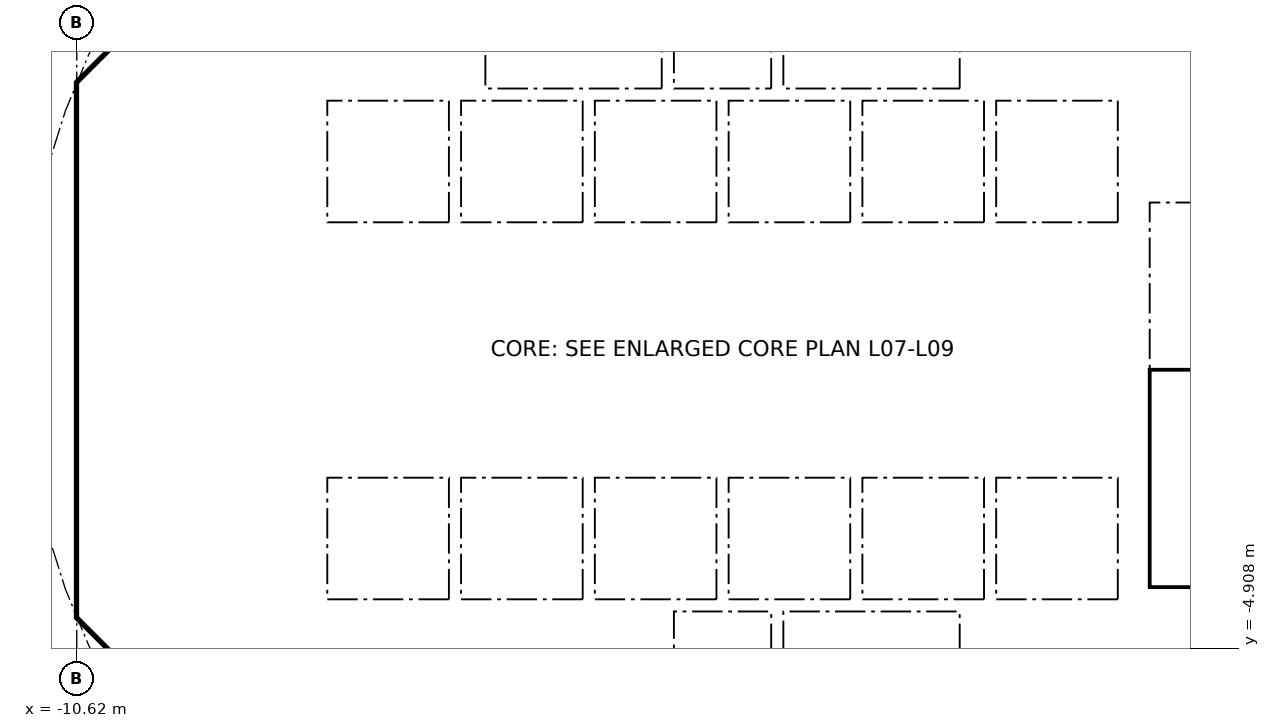
"""IFC4 building model, lengths in metres.
Left out: names, types, materials, properties, quantities, classifications, styles, units other than length and angle.
Written with IfcOpenShell. Run it as: python <this file> out.ifc"""

import sys

from ifc_helpers import new_model, si_unit, direction, frame, frame_2d, origin, place, context, subcontext, project, spatial, polyline, rectangle, outline, extrude, element, fill, save


model = new_model("IFC4")
c1 = context("Model", 3, precision=1e-05, world=origin(), true_north=direction((0.0, 1.0)))
c2 = subcontext(c1, "Body", "Model", "MODEL_VIEW")
j1 = project(units=[si_unit("LENGTHUNIT", "METRE"), si_unit("PLANEANGLEUNIT", "RADIAN")], contexts=[c1])
p1 = place(None, origin())
s1 = spatial("IfcSite", under=j1, at=p1, CompositionType="ELEMENT")
p2 = place(p1, origin())
s2 = spatial("IfcBuilding", under=s1, at=p2, CompositionType="ELEMENT")
p3 = place(p2, frame((0.0, 0.0, 38.1)))
s3 = spatial("IfcBuildingStorey", under=s2, at=p3, CompositionType="ELEMENT", Elevation=38.1)
p4 = place(p3, frame((9.988, 4.613, 0.0), z_axis=(0.0, 0.0, 1.0), x_axis=(-0.707106781187, 0.707106781187, 0.0)))
e1 = element("IfcWall", 1, at=p4, inside=s3, PredefinedType="SHEAR", context=c2, shape_type="SweptSolid", body=[
    extrude(rectangle(XDim=7.602, YDim=0.6, at=frame_2d((3.801, 0.0))), origin(), (0.0, 0.0, 1.0), 3.44),
])
p5 = place(p4, frame((3.201, 0.0, 0.0)))
e2 = element("IfcOpeningElement", 2, at=p5, cuts=e1, PredefinedType="OPENING", context=c2, shape_type="SweptSolid", body=[
    extrude(rectangle(XDim=1.2, YDim=2.1, at=frame_2d((0.6, 1.05))), frame((0.0, 0.31, 0.0), z_axis=(0.0, -1.0, 0.0), x_axis=(1.0, 0.0, 0.0)), (0.0, 0.0, 1.0), 0.62),
])
p6 = place(p3, frame((-4.613, 9.988, 0.0), z_axis=(0.0, 0.0, 1.0), x_axis=(-0.707106781187, -0.707106781187, 0.0)))
e3 = element("IfcWall", 3, at=p6, inside=s3, PredefinedType="SHEAR", context=c2, shape_type="SweptSolid", body=[
    extrude(rectangle(XDim=7.602, YDim=0.6, at=frame_2d((3.801, 0.0))), origin(), (0.0, 0.0, 1.0), 3.44),
])
p7 = place(p6, frame((0.351, 0.0, 0.0)))
e4 = element("IfcOpeningElement", 4, at=p7, cuts=e3, PredefinedType="OPENING", context=c2, shape_type="SweptSolid", body=[
    extrude(rectangle(XDim=1.1, YDim=2.1, at=frame_2d((0.55, 1.05))), frame((0.0, 0.31, 0.0), z_axis=(0.0, -1.0, 0.0), x_axis=(1.0, 0.0, 0.0)), (0.0, 0.0, 1.0), 0.62),
])
p8 = place(p3, frame((-10.325, 3.801, 0.0), z_axis=(0.0, 0.0, 1.0), x_axis=(0.0, -1.0, 0.0)))
e5 = element("IfcWall", 5, at=p8, inside=s3, PredefinedType="SHEAR", context=c2, shape_type="SweptSolid", body=[
    extrude(rectangle(XDim=7.602, YDim=0.6, at=frame_2d((3.801, 0.0))), origin(), (0.0, 0.0, 1.0), 3.44),
])
p9 = place(p8, frame((0.651, 0.0, 0.0)))
e6 = element("IfcOpeningElement", 6, at=p9, cuts=e5, PredefinedType="OPENING", context=c2, shape_type="SweptSolid", body=[
    extrude(rectangle(XDim=1.5, YDim=2.1, at=frame_2d((0.75, 1.05))), frame((0.0, 0.31, 0.0), z_axis=(0.0, -1.0, 0.0), x_axis=(1.0, 0.0, 0.0)), (0.0, 0.0, 1.0), 0.62),
])
p10 = place(p8, frame((5.451, 0.0, 0.0)))
e7 = element("IfcOpeningElement", 7, at=p10, cuts=e5, PredefinedType="OPENING", context=c2, shape_type="SweptSolid", body=[
    extrude(rectangle(XDim=1.5, YDim=2.1, at=frame_2d((0.75, 1.05))), frame((0.0, 0.31, 0.0), z_axis=(0.0, -1.0, 0.0), x_axis=(1.0, 0.0, 0.0)), (0.0, 0.0, 1.0), 0.62),
])
p11 = place(p3, frame((-9.988, -4.613, 0.0), z_axis=(0.0, 0.0, 1.0), x_axis=(0.707106781187, -0.707106781187, 0.0)))
e8 = element("IfcWall", 8, at=p11, inside=s3, PredefinedType="SHEAR", context=c2, shape_type="SweptSolid", body=[
    extrude(rectangle(XDim=7.602, YDim=0.6, at=frame_2d((3.801, 0.0))), origin(), (0.0, 0.0, 1.0), 3.44),
])
p12 = place(p11, frame((6.151, 0.0, 0.0)))
e9 = element("IfcOpeningElement", 9, at=p12, cuts=e8, PredefinedType="OPENING", context=c2, shape_type="SweptSolid", body=[
    extrude(rectangle(XDim=1.1, YDim=2.1, at=frame_2d((0.55, 1.05))), frame((0.0, 0.31, 0.0), z_axis=(0.0, -1.0, 0.0), x_axis=(1.0, 0.0, 0.0)), (0.0, 0.0, 1.0), 0.62),
])
p13 = place(p3, frame((4.613, -9.988, 0.0), z_axis=(0.0, 0.0, 1.0), x_axis=(0.707106781187, 0.707106781187, 0.0)))
e10 = element("IfcWall", 10, at=p13, inside=s3, PredefinedType="SHEAR", context=c2, shape_type="SweptSolid", body=[
    extrude(rectangle(XDim=7.602, YDim=0.6, at=frame_2d((3.801, 0.0))), origin(), (0.0, 0.0, 1.0), 3.44),
])
p14 = place(p13, frame((3.201, 0.0, 0.0)))
e11 = element("IfcOpeningElement", 11, at=p14, cuts=e10, PredefinedType="OPENING", context=c2, shape_type="SweptSolid", body=[
    extrude(rectangle(XDim=1.2, YDim=2.1, at=frame_2d((0.6, 1.05))), frame((0.0, 0.31, 0.0), z_axis=(0.0, -1.0, 0.0), x_axis=(1.0, 0.0, 0.0)), (0.0, 0.0, 1.0), 0.62),
])
p15 = place(p3, frame((-6.2, 4.3, 0.0), z_axis=(0.0, 0.0, 1.0), x_axis=(0.0, 1.0, 0.0)))
e12 = element("IfcWall", 12, at=p15, inside=s3, PredefinedType="PARTITIONING", context=c2, shape_type="SweptSolid", body=[
    extrude(rectangle(XDim=3.527, YDim=0.15, at=frame_2d((1.763, 0.0))), origin(), (0.0, 0.0, 1.0), 3.44),
])
p16 = place(p15, frame((0.262, 0.0, 0.0)))
e13 = element("IfcOpeningElement", 13, at=p16, cuts=e12, PredefinedType="OPENING", context=c2, shape_type="SweptSolid", body=[
    extrude(rectangle(XDim=0.9, YDim=2.1, at=frame_2d((0.45, 1.05))), frame((0.0, 0.085, 0.0), z_axis=(0.0, -1.0, 0.0), x_axis=(1.0, 0.0, 0.0)), (0.0, 0.0, 1.0), 0.17),
])
p17 = place(p15, frame((2.138, 0.0, 0.0)))
e14 = element("IfcOpeningElement", 14, at=p17, cuts=e12, PredefinedType="OPENING", context=c2, shape_type="SweptSolid", body=[
    extrude(rectangle(XDim=0.9, YDim=2.1, at=frame_2d((0.45, 1.05))), frame((0.0, 0.085, 0.0), z_axis=(0.0, -1.0, 0.0), x_axis=(1.0, 0.0, 0.0)), (0.0, 0.0, 1.0), 0.17),
])
p18 = place(p3, frame((4.0, 4.3, 0.0), z_axis=(0.0, 0.0, 1.0), x_axis=(0.0, 1.0, 0.0)))
e15 = element("IfcWall", 15, at=p18, inside=s3, PredefinedType="SOLIDWALL", context=c2, shape_type="SweptSolid", body=[
    extrude(rectangle(XDim=2.2, YDim=0.2, at=frame_2d((1.1, 0.0))), origin(), (0.0, 0.0, 1.0), 3.44),
])
p19 = place(p18, frame((0.55, 0.0, 0.0)))
e16 = element("IfcOpeningElement", 16, at=p19, cuts=e15, PredefinedType="OPENING", context=c2, shape_type="SweptSolid", body=[
    extrude(rectangle(XDim=1.1, YDim=2.1, at=frame_2d((0.55, 1.05))), frame((0.0, 0.11, 0.0), z_axis=(0.0, -1.0, 0.0), x_axis=(1.0, 0.0, 0.0)), (0.0, 0.0, 1.0), 0.22),
])
p20 = place(p3, frame((-4.0, 4.3, 0.0), z_axis=(0.0, 0.0, 1.0), x_axis=(0.0, 1.0, 0.0)))
e17 = element("IfcWall", 17, at=p20, inside=s3, PredefinedType="SOLIDWALL", context=c2, shape_type="SweptSolid", body=[
    extrude(rectangle(XDim=2.2, YDim=0.2, at=frame_2d((1.1, 0.0))), origin(), (0.0, 0.0, 1.0), 3.44),
])
p21 = place(p20, frame((0.55, 0.0, 0.0)))
e18 = element("IfcOpeningElement", 18, at=p21, cuts=e17, PredefinedType="OPENING", context=c2, shape_type="SweptSolid", body=[
    extrude(rectangle(XDim=1.1, YDim=2.1, at=frame_2d((0.55, 1.05))), frame((0.0, 0.11, 0.0), z_axis=(0.0, -1.0, 0.0), x_axis=(1.0, 0.0, 0.0)), (0.0, 0.0, 1.0), 0.22),
])
p22 = place(p3, frame((-6.7, 2.0, 0.0), z_axis=(0.0, 0.0, 1.0), x_axis=(1.0, 0.0, 0.0)))
e19 = element("IfcWall", 19, at=p22, inside=s3, PredefinedType="SOLIDWALL", context=c2, shape_type="SweptSolid", body=[
    extrude(rectangle(XDim=13.4, YDim=0.2, at=frame_2d((6.7, 0.0))), origin(), (0.0, 0.0, 1.0), 3.44),
])
p23 = place(p22, frame((0.65, 0.0, 0.0)))
e20 = element("IfcOpeningElement", 20, at=p23, cuts=e19, PredefinedType="OPENING", context=c2, shape_type="SweptSolid", body=[
    extrude(rectangle(XDim=1.1, YDim=2.1, at=frame_2d((0.55, 1.05))), frame((0.0, 0.11, 0.0), z_axis=(0.0, -1.0, 0.0), x_axis=(1.0, 0.0, 0.0)), (0.0, 0.0, 1.0), 0.22),
])
p24 = place(p22, frame((2.85, 0.0, 0.0)))
e21 = element("IfcOpeningElement", 21, at=p24, cuts=e19, PredefinedType="OPENING", context=c2, shape_type="SweptSolid", body=[
    extrude(rectangle(XDim=1.1, YDim=2.1, at=frame_2d((0.55, 1.05))), frame((0.0, 0.11, 0.0), z_axis=(0.0, -1.0, 0.0), x_axis=(1.0, 0.0, 0.0)), (0.0, 0.0, 1.0), 0.22),
])
p25 = place(p22, frame((5.05, 0.0, 0.0)))
e22 = element("IfcOpeningElement", 22, at=p25, cuts=e19, PredefinedType="OPENING", context=c2, shape_type="SweptSolid", body=[
    extrude(rectangle(XDim=1.1, YDim=2.1, at=frame_2d((0.55, 1.05))), frame((0.0, 0.11, 0.0), z_axis=(0.0, -1.0, 0.0), x_axis=(1.0, 0.0, 0.0)), (0.0, 0.0, 1.0), 0.22),
])
p26 = place(p3, frame((6.7, 4.0, 0.0), z_axis=(0.0, 0.0, 1.0), x_axis=(1.0, 0.0, 0.0)))
e23 = element("IfcWall", 23, at=p26, inside=s3, PredefinedType="SOLIDWALL", context=c2, shape_type="SweptSolid", body=[
    extrude(rectangle(XDim=3.325, YDim=0.2, at=frame_2d((1.662, 0.0))), origin(), (0.0, 0.0, 1.0), 3.44),
])
p27 = place(p26, frame((1.25, 0.0, 0.0)))
e24 = element("IfcOpeningElement", 24, at=p27, cuts=e23, PredefinedType="OPENING", context=c2, shape_type="SweptSolid", body=[
    extrude(rectangle(XDim=1.1, YDim=2.1, at=frame_2d((0.55, 1.05))), frame((0.0, 0.11, 0.0), z_axis=(0.0, -1.0, 0.0), x_axis=(1.0, 0.0, 0.0)), (0.0, 0.0, 1.0), 0.22),
])
p28 = place(p3, frame((-6.2, -7.827, 0.0), z_axis=(0.0, 0.0, 1.0), x_axis=(0.0, 1.0, 0.0)))
e25 = element("IfcWall", 25, at=p28, inside=s3, PredefinedType="PARTITIONING", context=c2, shape_type="SweptSolid", body=[
    extrude(rectangle(XDim=3.527, YDim=0.15, at=frame_2d((1.763, 0.0))), origin(), (0.0, 0.0, 1.0), 3.44),
])
p29 = place(p28, frame((2.365, 0.0, 0.0)))
e26 = element("IfcOpeningElement", 26, at=p29, cuts=e25, PredefinedType="OPENING", context=c2, shape_type="SweptSolid", body=[
    extrude(rectangle(XDim=0.9, YDim=2.1, at=frame_2d((0.45, 1.05))), frame((0.0, 0.085, 0.0), z_axis=(0.0, -1.0, 0.0), x_axis=(1.0, 0.0, 0.0)), (0.0, 0.0, 1.0), 0.17),
])
p30 = place(p28, frame((0.489, 0.0, 0.0)))
e27 = element("IfcOpeningElement", 27, at=p30, cuts=e25, PredefinedType="OPENING", context=c2, shape_type="SweptSolid", body=[
    extrude(rectangle(XDim=0.9, YDim=2.1, at=frame_2d((0.45, 1.05))), frame((0.0, 0.085, 0.0), z_axis=(0.0, -1.0, 0.0), x_axis=(1.0, 0.0, 0.0)), (0.0, 0.0, 1.0), 0.17),
])
p31 = place(p3, frame((4.0, -6.5, 0.0), z_axis=(0.0, 0.0, 1.0), x_axis=(0.0, 1.0, 0.0)))
e28 = element("IfcWall", 28, at=p31, inside=s3, PredefinedType="SOLIDWALL", context=c2, shape_type="SweptSolid", body=[
    extrude(rectangle(XDim=2.2, YDim=0.2, at=frame_2d((1.1, 0.0))), origin(), (0.0, 0.0, 1.0), 3.44),
])
p32 = place(p31, frame((0.55, 0.0, 0.0)))
e29 = element("IfcOpeningElement", 29, at=p32, cuts=e28, PredefinedType="OPENING", context=c2, shape_type="SweptSolid", body=[
    extrude(rectangle(XDim=1.1, YDim=2.1, at=frame_2d((0.55, 1.05))), frame((0.0, 0.11, 0.0), z_axis=(0.0, -1.0, 0.0), x_axis=(1.0, 0.0, 0.0)), (0.0, 0.0, 1.0), 0.22),
])
p33 = place(p3, frame((-4.0, -6.5, 0.0), z_axis=(0.0, 0.0, 1.0), x_axis=(0.0, 1.0, 0.0)))
e30 = element("IfcWall", 30, at=p33, inside=s3, PredefinedType="SOLIDWALL", context=c2, shape_type="SweptSolid", body=[
    extrude(rectangle(XDim=2.2, YDim=0.2, at=frame_2d((1.1, 0.0))), origin(), (0.0, 0.0, 1.0), 3.44),
])
p34 = place(p33, frame((0.65, 0.0, 0.0)))
e31 = element("IfcOpeningElement", 31, at=p34, cuts=e30, PredefinedType="OPENING", context=c2, shape_type="SweptSolid", body=[
    extrude(rectangle(XDim=0.9, YDim=2.1, at=frame_2d((0.45, 1.05))), frame((0.0, 0.11, 0.0), z_axis=(0.0, -1.0, 0.0), x_axis=(1.0, 0.0, 0.0)), (0.0, 0.0, 1.0), 0.22),
])
p35 = place(p3, frame((-6.7, -2.0, 0.0), z_axis=(0.0, 0.0, 1.0), x_axis=(1.0, 0.0, 0.0)))
e32 = element("IfcWall", 32, at=p35, inside=s3, PredefinedType="SOLIDWALL", context=c2, shape_type="SweptSolid", body=[
    extrude(rectangle(XDim=13.4, YDim=0.2, at=frame_2d((6.7, 0.0))), origin(), (0.0, 0.0, 1.0), 3.44),
])
p36 = place(p35, frame((0.65, 0.0, 0.0)))
e33 = element("IfcOpeningElement", 33, at=p36, cuts=e32, PredefinedType="OPENING", context=c2, shape_type="SweptSolid", body=[
    extrude(rectangle(XDim=1.1, YDim=2.1, at=frame_2d((0.55, 1.05))), frame((0.0, 0.11, 0.0), z_axis=(0.0, -1.0, 0.0), x_axis=(1.0, 0.0, 0.0)), (0.0, 0.0, 1.0), 0.22),
])
p37 = place(p35, frame((2.85, 0.0, 0.0)))
e34 = element("IfcOpeningElement", 34, at=p37, cuts=e32, PredefinedType="OPENING", context=c2, shape_type="SweptSolid", body=[
    extrude(rectangle(XDim=1.1, YDim=2.1, at=frame_2d((0.55, 1.05))), frame((0.0, 0.11, 0.0), z_axis=(0.0, -1.0, 0.0), x_axis=(1.0, 0.0, 0.0)), (0.0, 0.0, 1.0), 0.22),
])
p38 = place(p3, origin())
e35 = element("IfcWall", 35, at=p38, inside=s3, PredefinedType="SHEAR", context=c2, shape_type="SweptSolid", body=[
    extrude(outline(polyline([(-10.625, -3.801), (-10.025, -3.801), (-10.025, -4.152), (-9.776, -4.401), (-10.2, -4.825), (-10.625, -4.401), (-10.625, -3.801)])), origin(), (0.0, 0.0, 1.0), 3.44),
])
p39 = place(p3, origin())
e36 = element("IfcWall", 36, at=p39, inside=s3, PredefinedType="SHEAR", context=c2, shape_type="SweptSolid", body=[
    extrude(outline(polyline([(-10.2, 4.825), (-9.776, 4.401), (-10.025, 4.152), (-10.025, 3.801), (-10.625, 3.801), (-10.625, 4.401), (-10.2, 4.825)])), origin(), (0.0, 0.0, 1.0), 3.44),
])
for number, where, z_axis, x_axis in (
    (37, (-10.025, -4.0, 0.0), (0.0, 0.0, 1.0), (1.0, 0.0, 0.0)),
    (38, (-10.025, 4.0, 0.0), (0.0, 0.0, 1.0), (1.0, 0.0, 0.0)),
):
    element("IfcWall", number, at=place(p3, frame(where, z_axis=z_axis, x_axis=x_axis)), inside=s3, PredefinedType="PARTITIONING", context=c2, shape_type="SweptSolid", body=[
        extrude(rectangle(XDim=3.325, YDim=0.2, at=frame_2d((1.662, 0.0))), origin(), (0.0, 0.0, 1.0), 3.44),
    ])
for number, where, z_axis, x_axis in (
    (39, (-0.9, -6.5, 0.0), (0.0, 0.0, 1.0), (0.0, 1.0, 0.0)),
    (40, (0.9, -6.5, 0.0), (0.0, 0.0, 1.0), (0.0, 1.0, 0.0)),
):
    element("IfcWall", number, at=place(p3, frame(where, z_axis=z_axis, x_axis=x_axis)), inside=s3, PredefinedType="SOLIDWALL", context=c2, shape_type="SweptSolid", body=[
        extrude(rectangle(XDim=2.2, YDim=0.2, at=frame_2d((1.1, 0.0))), origin(), (0.0, 0.0, 1.0), 3.44),
    ])
p40 = place(p3, origin())
e41 = element("IfcWall", 41, at=p40, inside=s3, PredefinedType="SOLIDWALL", context=c2, shape_type="SweptSolid", body=[
    extrude(outline(polyline([(-6.7, -2.1), (-6.5, -2.1), (-6.5, -4.1), (-4.5, -4.1), (-4.5, -2.1), (-4.3, -2.1), (-4.3, -4.1), (-2.3, -4.1), (-2.3, -2.1), (-2.1, -2.1), (-2.1, -4.1), (-0.1, -4.1), (-0.1, -2.1), (0.1, -2.1), (0.1, -4.1), (2.1, -4.1), (2.1, -2.1), (2.3, -2.1), (2.3, -4.1), (4.3, -4.1), (4.3, -2.1), (4.5, -2.1), (4.5, -4.1), (6.5, -4.1), (6.5, -2.1), (6.7, -2.1), (6.7, -4.3), (-6.7, -4.3), (-6.7, -2.1)])), origin(), (0.0, 0.0, 1.0), 3.44),
])
for number, where, z_axis, x_axis in (
    (42, (-0.9, 4.3, 0.0), (0.0, 0.0, 1.0), (0.0, 1.0, 0.0)),
    (43, (0.9, 4.3, 0.0), (0.0, 0.0, 1.0), (0.0, 1.0, 0.0)),
):
    element("IfcWall", number, at=place(p3, frame(where, z_axis=z_axis, x_axis=x_axis)), inside=s3, PredefinedType="SOLIDWALL", context=c2, shape_type="SweptSolid", body=[
        extrude(rectangle(XDim=2.2, YDim=0.2, at=frame_2d((1.1, 0.0))), origin(), (0.0, 0.0, 1.0), 3.44),
    ])
p41 = place(p3, origin())
e44 = element("IfcWall", 44, at=p41, inside=s3, PredefinedType="SOLIDWALL", context=c2, shape_type="SweptSolid", body=[
    extrude(outline(polyline([(-6.5, 2.1), (-6.7, 2.1), (-6.7, 4.3), (6.7, 4.3), (6.7, 2.1), (6.5, 2.1), (6.5, 4.1), (4.5, 4.1), (4.5, 2.1), (4.3, 2.1), (4.3, 4.1), (2.3, 4.1), (2.3, 2.1), (2.1, 2.1), (2.1, 4.1), (0.1, 4.1), (0.1, 2.1), (-0.1, 2.1), (-0.1, 4.1), (-2.1, 4.1), (-2.1, 2.1), (-2.3, 2.1), (-2.3, 4.1), (-4.3, 4.1), (-4.3, 2.1), (-4.5, 2.1), (-4.5, 4.1), (-6.5, 4.1), (-6.5, 2.1)])), origin(), (0.0, 0.0, 1.0), 3.44),
])
p42 = place(p3, origin())
e45 = element("IfcWall", 45, at=p42, inside=s3, PredefinedType="SOLIDWALL", context=c2, shape_type="SweptSolid", body=[
    extrude(outline(polyline([(7.025, -3.9), (6.7, -3.9), (6.7, 3.9), (7.025, 3.9), (7.025, -3.9)])), origin(), (0.0, 0.0, 1.0), 3.44),
])
p43 = place(p3, origin())
e46 = element("IfcWall", 46, at=p43, inside=s3, PredefinedType="SOLIDWALL", context=c2, shape_type="SweptSolid", body=[
    extrude(outline(polyline([(10.025, -4.1), (6.7, -4.1), (6.7, -3.9), (10.025, -3.9), (10.025, -4.1)])), origin(), (0.0, 0.0, 1.0), 3.44),
])
p44 = place(p23, origin())
e47 = element("IfcDoor", 47, at=p44, inside=s3, OperationType="DOUBLE_DOOR_SLIDING", PredefinedType="DOOR", context=c2, shape_type="SweptSolid", body=[
    extrude(rectangle(XDim=1.1, YDim=2.1, at=frame_2d((0.55, 1.05))), frame((0.0, 0.025, 0.0), z_axis=(0.0, -1.0, 0.0), x_axis=(1.0, 0.0, 0.0)), (0.0, 0.0, 1.0), 0.05),
])
fill(e20, e47)
p45 = place(p24, origin())
e48 = element("IfcDoor", 48, at=p45, inside=s3, OperationType="DOUBLE_DOOR_SLIDING", PredefinedType="DOOR", context=c2, shape_type="SweptSolid", body=[
    extrude(rectangle(XDim=1.1, YDim=2.1, at=frame_2d((0.55, 1.05))), frame((0.0, 0.025, 0.0), z_axis=(0.0, -1.0, 0.0), x_axis=(1.0, 0.0, 0.0)), (0.0, 0.0, 1.0), 0.05),
])
fill(e21, e48)
p46 = place(p25, origin())
e49 = element("IfcDoor", 49, at=p46, inside=s3, OperationType="DOUBLE_DOOR_SLIDING", PredefinedType="DOOR", context=c2, shape_type="SweptSolid", body=[
    extrude(rectangle(XDim=1.1, YDim=2.1, at=frame_2d((0.55, 1.05))), frame((0.0, 0.025, 0.0), z_axis=(0.0, -1.0, 0.0), x_axis=(1.0, 0.0, 0.0)), (0.0, 0.0, 1.0), 0.05),
])
fill(e22, e49)
p47 = place(p36, origin())
e50 = element("IfcDoor", 50, at=p47, inside=s3, OperationType="DOUBLE_DOOR_SLIDING", PredefinedType="DOOR", context=c2, shape_type="SweptSolid", body=[
    extrude(rectangle(XDim=1.1, YDim=2.1, at=frame_2d((0.55, 1.05))), frame((0.0, 0.025, 0.0), z_axis=(0.0, -1.0, 0.0), x_axis=(1.0, 0.0, 0.0)), (0.0, 0.0, 1.0), 0.05),
])
fill(e33, e50)
p48 = place(p37, origin())
e51 = element("IfcDoor", 51, at=p48, inside=s3, OperationType="DOUBLE_DOOR_SLIDING", PredefinedType="DOOR", context=c2, shape_type="SweptSolid", body=[
    extrude(rectangle(XDim=1.1, YDim=2.1, at=frame_2d((0.55, 1.05))), frame((0.0, 0.025, 0.0), z_axis=(0.0, -1.0, 0.0), x_axis=(1.0, 0.0, 0.0)), (0.0, 0.0, 1.0), 0.05),
])
fill(e34, e51)
p49 = place(p19, origin())
e52 = element("IfcDoor", 52, at=p49, inside=s3, OperationType="DOUBLE_DOOR_SLIDING", PredefinedType="DOOR", context=c2, shape_type="SweptSolid", body=[
    extrude(rectangle(XDim=1.1, YDim=2.1, at=frame_2d((0.55, 1.05))), frame((0.0, 0.025, 0.0), z_axis=(0.0, -1.0, 0.0), x_axis=(1.0, 0.0, 0.0)), (0.0, 0.0, 1.0), 0.05),
])
fill(e16, e52)
p50 = place(p32, origin())
e53 = element("IfcDoor", 53, at=p50, inside=s3, OperationType="DOUBLE_DOOR_SLIDING", PredefinedType="DOOR", context=c2, shape_type="SweptSolid", body=[
    extrude(rectangle(XDim=1.1, YDim=2.1, at=frame_2d((0.55, 1.05))), frame((0.0, 0.025, 0.0), z_axis=(0.0, -1.0, 0.0), x_axis=(1.0, 0.0, 0.0)), (0.0, 0.0, 1.0), 0.05),
])
fill(e29, e53)
p51 = place(p21, origin())
e54 = element("IfcDoor", 54, at=p51, inside=s3, OperationType="DOUBLE_DOOR_SLIDING", PredefinedType="DOOR", context=c2, shape_type="SweptSolid", body=[
    extrude(rectangle(XDim=1.1, YDim=2.1, at=frame_2d((0.55, 1.05))), frame((0.0, 0.025, 0.0), z_axis=(0.0, -1.0, 0.0), x_axis=(1.0, 0.0, 0.0)), (0.0, 0.0, 1.0), 0.05),
])
fill(e18, e54)
p52 = place(p16, origin())
e55 = element("IfcDoor", 55, at=p52, inside=s3, OperationType="SINGLE_SWING_LEFT", PredefinedType="DOOR", context=c2, shape_type="SweptSolid", body=[
    extrude(rectangle(XDim=0.9, YDim=2.1, at=frame_2d((0.45, 1.05))), frame((0.0, 0.025, 0.0), z_axis=(0.0, -1.0, 0.0), x_axis=(1.0, 0.0, 0.0)), (0.0, 0.0, 1.0), 0.05),
])
fill(e13, e55)
p53 = place(p29, origin())
e56 = element("IfcDoor", 56, at=p53, inside=s3, OperationType="SINGLE_SWING_LEFT", PredefinedType="DOOR", context=c2, shape_type="SweptSolid", body=[
    extrude(rectangle(XDim=0.9, YDim=2.1, at=frame_2d((0.45, 1.05))), frame((0.0, 0.025, 0.0), z_axis=(0.0, -1.0, 0.0), x_axis=(1.0, 0.0, 0.0)), (0.0, 0.0, 1.0), 0.05),
])
fill(e26, e56)
p54 = place(p9, origin())
e57 = element("IfcDoor", 57, at=p54, inside=s3, OperationType="DOUBLE_DOOR_SINGLE_SWING", PredefinedType="DOOR", context=c2, shape_type="SweptSolid", body=[
    extrude(rectangle(XDim=1.5, YDim=2.1, at=frame_2d((0.75, 1.05))), frame((0.0, 0.025, 0.0), z_axis=(0.0, -1.0, 0.0), x_axis=(1.0, 0.0, 0.0)), (0.0, 0.0, 1.0), 0.05),
])
fill(e6, e57)
p55 = place(p10, origin())
e58 = element("IfcDoor", 58, at=p55, inside=s3, OperationType="DOUBLE_DOOR_SINGLE_SWING", PredefinedType="DOOR", context=c2, shape_type="SweptSolid", body=[
    extrude(rectangle(XDim=1.5, YDim=2.1, at=frame_2d((0.75, 1.05))), frame((0.0, 0.025, 0.0), z_axis=(0.0, -1.0, 0.0), x_axis=(1.0, 0.0, 0.0)), (0.0, 0.0, 1.0), 0.05),
])
fill(e7, e58)
save(model, sys.argv[1])
